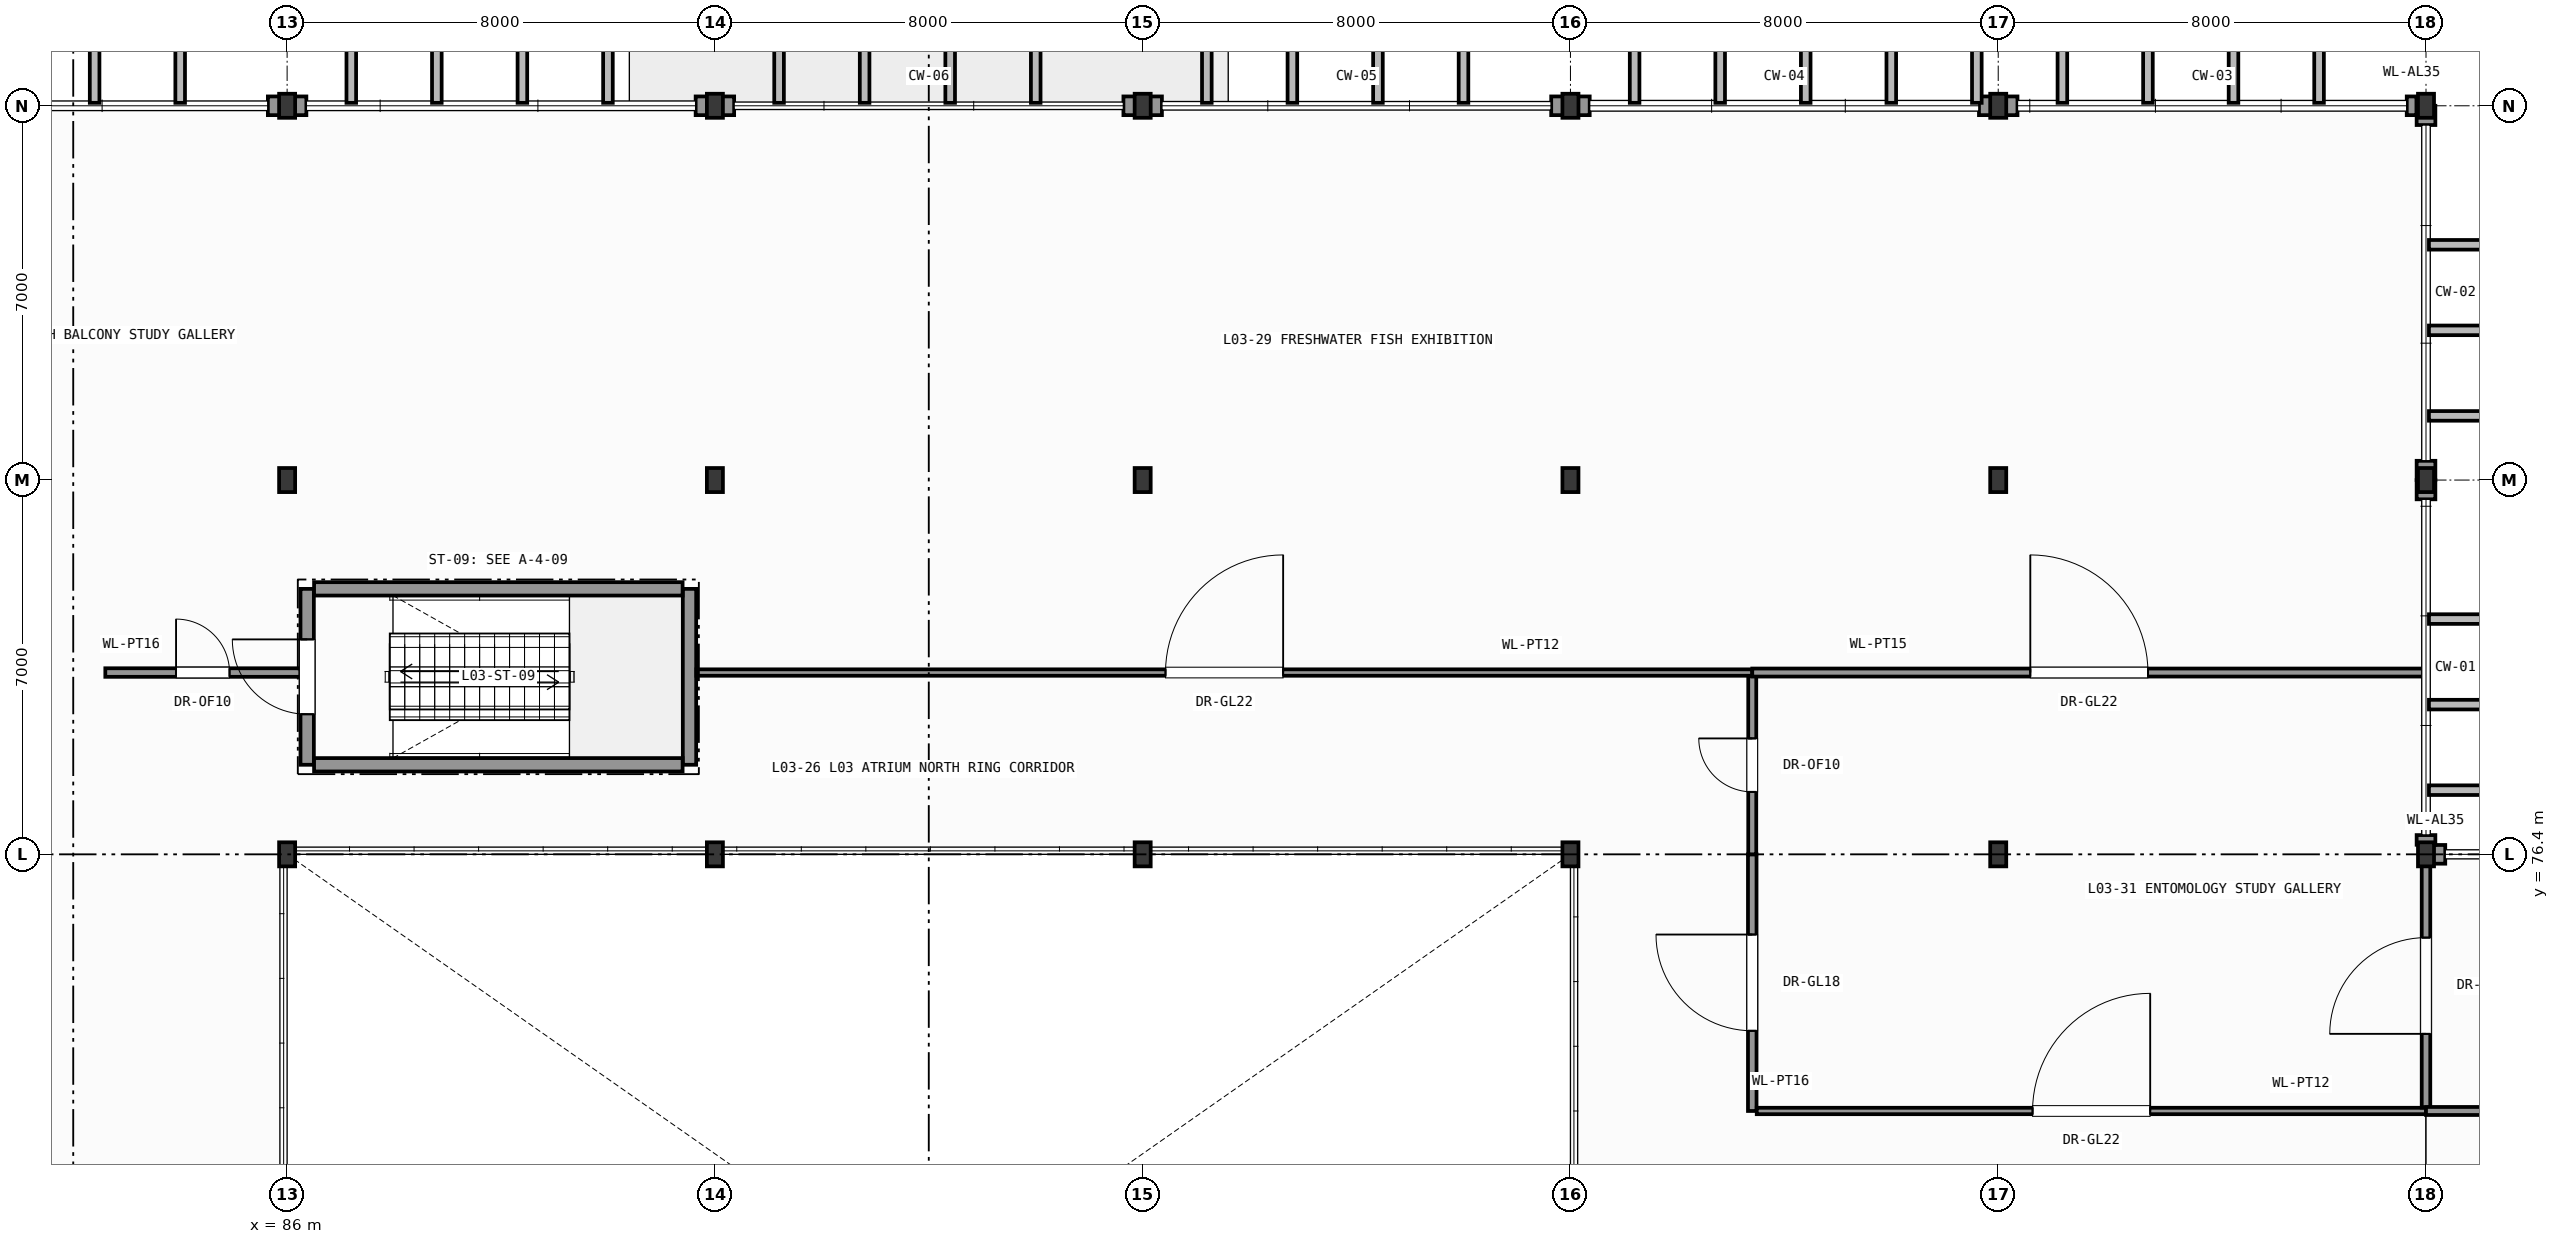
"""IFC4 building model, lengths in metres.
Left out: names, types, materials, properties, quantities, classifications, styles, units other than length and angle.
Written with IfcOpenShell. Run it as: python <this file> out.ifc"""

import sys

from ifc_helpers import new_model, si_unit, direction, frame, frame_2d, origin, origin_2d, place, context, subcontext, project, spatial, rectangle, i_section, extrude, element, fill, save


model = new_model("IFC4")
c1 = context("Model", 3, precision=1e-05, world=origin(), true_north=direction((0.0, 1.0)))
c2 = subcontext(c1, "Body", "Model", "MODEL_VIEW")
j1 = project(units=[si_unit("LENGTHUNIT", "METRE"), si_unit("PLANEANGLEUNIT", "RADIAN")], contexts=[c1])
p1 = place(None, origin())
s1 = spatial("IfcSite", under=j1, at=p1, CompositionType="ELEMENT")
p2 = place(p1, origin())
s2 = spatial("IfcBuilding", under=s1, at=p2, CompositionType="ELEMENT")
p3 = place(p2, frame((0.0, 0.0, 13.2)))
s3 = spatial("IfcBuildingStorey", under=s2, at=p3, CompositionType="ELEMENT", Elevation=13.2)
for number, where, z_axis, x_axis in (
    (1, (86.0, 76.4, 0.0), (0.0, 0.0, 1.0), (1.0, 0.0, 0.0)),
    (2, (86.0, 83.4, 0.0), (0.0, 0.0, 1.0), (1.0, 0.0, 0.0)),
    (3, (86.0, 90.4, 0.0), (0.0, 0.0, 1.0), (1.0, 0.0, 0.0)),
    (4, (94.0, 76.4, 0.0), (0.0, 0.0, 1.0), (1.0, 0.0, 0.0)),
    (5, (94.0, 83.4, 0.0), (0.0, 0.0, 1.0), (1.0, 0.0, 0.0)),
    (6, (94.0, 90.4, 0.0), (0.0, 0.0, 1.0), (1.0, 0.0, 0.0)),
    (7, (102.0, 76.4, 0.0), (0.0, 0.0, 1.0), (1.0, 0.0, 0.0)),
    (8, (102.0, 83.4, 0.0), (0.0, 0.0, 1.0), (1.0, 0.0, 0.0)),
    (9, (102.0, 90.4, 0.0), (0.0, 0.0, 1.0), (1.0, 0.0, 0.0)),
    (10, (110.0, 76.4, 0.0), (0.0, 0.0, 1.0), (1.0, 0.0, 0.0)),
    (11, (110.0, 83.4, 0.0), (0.0, 0.0, 1.0), (1.0, 0.0, 0.0)),
    (12, (110.0, 90.4, 0.0), (0.0, 0.0, 1.0), (1.0, 0.0, 0.0)),
    (13, (118.0, 76.4, 0.0), (0.0, 0.0, 1.0), (1.0, 0.0, 0.0)),
    (14, (118.0, 83.4, 0.0), (0.0, 0.0, 1.0), (1.0, 0.0, 0.0)),
    (15, (118.0, 90.4, 0.0), (0.0, 0.0, 1.0), (1.0, 0.0, 0.0)),
    (16, (126.0, 76.4, 0.0), (0.0, 0.0, 1.0), (1.0, 0.0, 0.0)),
    (17, (126.0, 83.4, 0.0), (0.0, 0.0, 1.0), (1.0, 0.0, 0.0)),
    (18, (126.0, 90.4, 0.0), (0.0, 0.0, 1.0), (1.0, 0.0, 0.0)),
):
    element("IfcColumn", number, at=place(p3, frame(where, z_axis=z_axis, x_axis=x_axis)), inside=s3, PredefinedType="COLUMN", context=c2, shape_type="SweptSolid", body=[
        extrude(i_section(OverallWidth=0.3, OverallDepth=0.45, WebThickness=0.014, FlangeThickness=0.026, FilletRadius=0.027, at=origin_2d()), origin(), (0.0, 0.0, 1.0), 4.8),
    ])
p4 = place(p3, frame((126.36, 76.4, 0.0), z_axis=(0.0, 0.0, 1.0), x_axis=(-1.0, 0.0, 0.0)))
e19 = element("IfcWall", 19, at=p4, inside=s3, PredefinedType="SOLIDWALL", context=c2, shape_type="SweptSolid", body=[
    extrude(rectangle(XDim=0.36, YDim=0.35, at=frame_2d((0.18, 0.0))), origin(), (0.0, 0.0, 1.0), 4.155),
])
p5 = place(p3, frame((126.0, 76.579, 0.0), z_axis=(0.0, 0.0, 1.0), x_axis=(0.0, 1.0, 0.0)))
e20 = element("IfcWall", 20, at=p5, inside=s3, PredefinedType="SOLIDWALL", context=c2, shape_type="SweptSolid", body=[
    extrude(rectangle(XDim=0.181, YDim=0.35, at=frame_2d((0.09, 0.0))), origin(), (0.0, 0.0, 1.0), 4.56),
])
p6 = place(p3, frame((126.0, 83.04, 0.0), z_axis=(0.0, 0.0, 1.0), x_axis=(0.0, 1.0, 0.0)))
e21 = element("IfcWall", 21, at=p6, inside=s3, PredefinedType="SOLIDWALL", context=c2, shape_type="SweptSolid", body=[
    extrude(rectangle(XDim=0.36, YDim=0.35, at=frame_2d((0.18, 0.0))), origin(), (0.0, 0.0, 1.0), 4.255),
])
p7 = place(p3, frame((126.0, 83.4, 0.0), z_axis=(0.0, 0.0, 1.0), x_axis=(0.0, 1.0, 0.0)))
e22 = element("IfcWall", 22, at=p7, inside=s3, PredefinedType="SOLIDWALL", context=c2, shape_type="SweptSolid", body=[
    extrude(rectangle(XDim=0.36, YDim=0.35, at=frame_2d((0.18, 0.0))), origin(), (0.0, 0.0, 1.0), 4.255),
])
p8 = place(p3, frame((126.0, 90.04, 0.0), z_axis=(0.0, 0.0, 1.0), x_axis=(0.0, 1.0, 0.0)))
e23 = element("IfcWall", 23, at=p8, inside=s3, PredefinedType="SOLIDWALL", context=c2, shape_type="SweptSolid", body=[
    extrude(rectangle(XDim=0.36, YDim=0.35, at=frame_2d((0.18, 0.0))), origin(), (0.0, 0.0, 1.0), 4.255),
])
p9 = place(p3, frame((125.821, 90.4, 0.0), z_axis=(0.0, 0.0, 1.0), x_axis=(-1.0, 0.0, 0.0)))
e24 = element("IfcWall", 24, at=p9, inside=s3, PredefinedType="SOLIDWALL", context=c2, shape_type="SweptSolid", body=[
    extrude(rectangle(XDim=0.181, YDim=0.35, at=frame_2d((0.091, 0.0))), origin(), (0.0, 0.0, 1.0), 4.56),
])
for number, where, z_axis, x_axis in (
    (25, (118.36, 90.4, 0.0), (0.0, 0.0, 1.0), (-1.0, 0.0, 0.0)),
    (26, (118.0, 90.4, 0.0), (0.0, 0.0, 1.0), (-1.0, 0.0, 0.0)),
    (27, (110.36, 90.4, 0.0), (0.0, 0.0, 1.0), (-1.0, 0.0, 0.0)),
    (28, (110.0, 90.4, 0.0), (0.0, 0.0, 1.0), (-1.0, 0.0, 0.0)),
    (29, (102.36, 90.4, 0.0), (0.0, 0.0, 1.0), (-1.0, 0.0, 0.0)),
    (30, (102.0, 90.4, 0.0), (0.0, 0.0, 1.0), (-1.0, 0.0, 0.0)),
    (31, (94.36, 90.4, 0.0), (0.0, 0.0, 1.0), (-1.0, 0.0, 0.0)),
    (32, (94.0, 90.4, 0.0), (0.0, 0.0, 1.0), (-1.0, 0.0, 0.0)),
    (33, (86.36, 90.4, 0.0), (0.0, 0.0, 1.0), (-1.0, 0.0, 0.0)),
    (34, (86.0, 90.4, 0.0), (0.0, 0.0, 1.0), (-1.0, 0.0, 0.0)),
):
    element("IfcWall", number, at=place(p3, frame(where, z_axis=z_axis, x_axis=x_axis)), inside=s3, PredefinedType="SOLIDWALL", context=c2, shape_type="SweptSolid", body=[
        extrude(rectangle(XDim=0.36, YDim=0.35, at=frame_2d((0.18, 0.0))), origin(), (0.0, 0.0, 1.0), 4.155),
    ])
p10 = place(p3, frame((86.375, 78.075, 0.0), z_axis=(0.0, 0.0, 1.0), x_axis=(0.0, 1.0, 0.0)))
e35 = element("IfcWall", 35, at=p10, inside=s3, PredefinedType="SHEAR", context=c2, shape_type="SweptSolid", body=[
    extrude(rectangle(XDim=3.29, YDim=0.25, at=frame_2d((1.645, 0.0))), origin(), (0.0, 0.0, 1.0), 4.56),
])
p11 = place(p10, frame((0.945, 0.0, 0.0)))
e36 = element("IfcOpeningElement", 36, at=p11, cuts=e35, PredefinedType="OPENING", context=c2, shape_type="SweptSolid", body=[
    extrude(rectangle(XDim=1.4, YDim=2.2, at=frame_2d((0.7, 1.1))), frame((0.0, 0.135, 0.0), z_axis=(0.0, -1.0, 0.0), x_axis=(1.0, 0.0, 0.0)), (0.0, 0.0, 1.0), 0.27),
])
p12 = place(p3, frame((93.525, 78.075, 0.0), z_axis=(0.0, 0.0, 1.0), x_axis=(0.0, 1.0, 0.0)))
e37 = element("IfcWall", 37, at=p12, inside=s3, PredefinedType="SHEAR", context=c2, shape_type="SweptSolid", body=[
    extrude(rectangle(XDim=3.29, YDim=0.25, at=frame_2d((1.645, 0.0))), origin(), (0.0, 0.0, 1.0), 4.56),
])
for number, where, z_axis, x_axis in (
    (38, (86.504, 78.075, 0.0), (0.0, 0.0, 1.0), (1.0, 0.0, 0.0)),
    (39, (86.504, 81.365, 0.0), (0.0, 0.0, 1.0), (1.0, 0.0, 0.0)),
):
    element("IfcWall", number, at=place(p3, frame(where, z_axis=z_axis, x_axis=x_axis)), inside=s3, PredefinedType="SHEAR", context=c2, shape_type="SweptSolid", body=[
        extrude(rectangle(XDim=6.892, YDim=0.25, at=frame_2d((3.446, 0.0))), origin(), (0.0, 0.0, 1.0), 4.56),
    ])
p13 = place(p3, frame((113.4, 71.6, 0.0), z_axis=(0.0, 0.0, 1.0), x_axis=(0.0, 1.0, 0.0)))
e40 = element("IfcWall", 40, at=p13, inside=s3, PredefinedType="PARTITIONING", context=c2, shape_type="SweptSolid", body=[
    extrude(rectangle(XDim=4.8, YDim=0.16, at=frame_2d((2.4, 0.0))), origin(), (0.0, 0.0, 1.0), 4.56),
])
p14 = place(p13, frame((1.5, 0.0, 0.0)))
e41 = element("IfcOpeningElement", 41, at=p14, cuts=e40, PredefinedType="OPENING", context=c2, shape_type="SweptSolid", body=[
    extrude(rectangle(XDim=1.8, YDim=2.4, at=frame_2d((0.9, 1.2))), frame((0.0, 0.09, 0.0), z_axis=(0.0, -1.0, 0.0), x_axis=(1.0, 0.0, 0.0)), (0.0, 0.0, 1.0), 0.18),
])
p15 = place(p3, frame((93.654, 79.8, 0.0), z_axis=(0.0, 0.0, 1.0), x_axis=(1.0, 0.0, 0.0)))
e42 = element("IfcWall", 42, at=p15, inside=s3, PredefinedType="PARTITIONING", context=c2, shape_type="SweptSolid", body=[
    extrude(rectangle(XDim=19.746, YDim=0.12, at=frame_2d((9.873, 0.0))), origin(), (0.0, 0.0, 1.0), 4.185),
])
p16 = place(p15, frame((8.773, 0.0, 0.0)))
e43 = element("IfcOpeningElement", 43, at=p16, cuts=e42, PredefinedType="OPENING", context=c2, shape_type="SweptSolid", body=[
    extrude(rectangle(XDim=2.2, YDim=2.6, at=frame_2d((1.1, 1.3))), frame((0.0, 0.07, 0.0), z_axis=(0.0, -1.0, 0.0), x_axis=(1.0, 0.0, 0.0)), (0.0, 0.0, 1.0), 0.14),
])
p17 = place(p3, frame((82.6, 79.8, 0.0), z_axis=(0.0, 0.0, 1.0), x_axis=(1.0, 0.0, 0.0)))
e44 = element("IfcWall", 44, at=p17, inside=s3, PredefinedType="PARTITIONING", context=c2, shape_type="SweptSolid", body=[
    extrude(rectangle(XDim=3.646, YDim=0.16, at=frame_2d((1.823, 0.0))), origin(), (0.0, 0.0, 1.0), 4.215),
])
p18 = place(p17, frame((1.323, 0.0, 0.0)))
e45 = element("IfcOpeningElement", 45, at=p18, cuts=e44, PredefinedType="OPENING", context=c2, shape_type="SweptSolid", body=[
    extrude(rectangle(XDim=1.0, YDim=2.15, at=frame_2d((0.5, 1.075))), frame((0.0, 0.09, 0.0), z_axis=(0.0, -1.0, 0.0), x_axis=(1.0, 0.0, 0.0)), (0.0, 0.0, 1.0), 0.18),
])
p19 = place(p3, frame((113.4, 76.4, 0.0), z_axis=(0.0, 0.0, 1.0), x_axis=(0.0, 1.0, 0.0)))
e46 = element("IfcWall", 46, at=p19, inside=s3, PredefinedType="PARTITIONING", context=c2, shape_type="SweptSolid", body=[
    extrude(rectangle(XDim=3.336, YDim=0.15, at=frame_2d((1.668, 0.0))), origin(), (0.0, 0.0, 1.0), 4.56),
])
p20 = place(p19, frame((1.168, 0.0, 0.0)))
e47 = element("IfcOpeningElement", 47, at=p20, cuts=e46, PredefinedType="OPENING", context=c2, shape_type="SweptSolid", body=[
    extrude(rectangle(XDim=1.0, YDim=2.15, at=frame_2d((0.5, 1.075))), frame((0.0, 0.085, 0.0), z_axis=(0.0, -1.0, 0.0), x_axis=(1.0, 0.0, 0.0)), (0.0, 0.0, 1.0), 0.17),
])
p21 = place(p3, frame((113.4, 79.8, 0.0), z_axis=(0.0, 0.0, 1.0), x_axis=(1.0, 0.0, 0.0)))
e48 = element("IfcWall", 48, at=p21, inside=s3, PredefinedType="PARTITIONING", context=c2, shape_type="SweptSolid", body=[
    extrude(rectangle(XDim=12.6, YDim=0.15, at=frame_2d((6.3, 0.0))), origin(), (0.0, 0.0, 1.0), 4.185),
])
p22 = place(p21, frame((5.2, 0.0, 0.0)))
e49 = element("IfcOpeningElement", 49, at=p22, cuts=e48, PredefinedType="OPENING", context=c2, shape_type="SweptSolid", body=[
    extrude(rectangle(XDim=2.2, YDim=2.6, at=frame_2d((1.1, 1.3))), frame((0.0, 0.085, 0.0), z_axis=(0.0, -1.0, 0.0), x_axis=(1.0, 0.0, 0.0)), (0.0, 0.0, 1.0), 0.17),
])
p23 = place(p3, frame((113.484, 71.6, 0.0), z_axis=(0.0, 0.0, 1.0), x_axis=(1.0, 0.0, 0.0)))
e50 = element("IfcWall", 50, at=p23, inside=s3, PredefinedType="PARTITIONING", context=c2, shape_type="SweptSolid", body=[
    extrude(rectangle(XDim=12.516, YDim=0.12, at=frame_2d((6.258, 0.0))), origin(), (0.0, 0.0, 1.0), 4.56),
])
p24 = place(p23, frame((5.158, 0.0, 0.0)))
e51 = element("IfcOpeningElement", 51, at=p24, cuts=e50, PredefinedType="OPENING", context=c2, shape_type="SweptSolid", body=[
    extrude(rectangle(XDim=2.2, YDim=2.6, at=frame_2d((1.1, 1.3))), frame((0.0, 0.07, 0.0), z_axis=(0.0, -1.0, 0.0), x_axis=(1.0, 0.0, 0.0)), (0.0, 0.0, 1.0), 0.14),
])
p25 = place(p3, frame((126.0, 71.664, 0.0), z_axis=(0.0, 0.0, 1.0), x_axis=(0.0, 1.0, 0.0)))
e52 = element("IfcWall", 52, at=p25, inside=s3, PredefinedType="PARTITIONING", context=c2, shape_type="SweptSolid", body=[
    extrude(rectangle(XDim=4.557, YDim=0.16, at=frame_2d((2.278, 0.0))), origin(), (0.0, 0.0, 1.0), 4.105),
])
p26 = place(p25, frame((1.378, 0.0, 0.0)))
e53 = element("IfcOpeningElement", 53, at=p26, cuts=e52, PredefinedType="OPENING", context=c2, shape_type="SweptSolid", body=[
    extrude(rectangle(XDim=1.8, YDim=2.4, at=frame_2d((0.9, 1.2))), frame((0.0, 0.09, 0.0), z_axis=(0.0, -1.0, 0.0), x_axis=(1.0, 0.0, 0.0)), (0.0, 0.0, 1.0), 0.18),
])
p27 = place(p3, frame((126.0, 71.6, 0.0), z_axis=(0.0, 0.0, 1.0), x_axis=(1.0, 0.0, 0.0)))
e54 = element("IfcWall", 54, at=p27, inside=s3, PredefinedType="PARTITIONING", context=c2, shape_type="SweptSolid", body=[
    extrude(rectangle(XDim=41.0, YDim=0.15, at=frame_2d((20.5, 0.0))), origin(), (0.0, 0.0, 1.0), 4.56),
])
p28 = place(p27, frame((19.4, 0.0, 0.0)))
e55 = element("IfcOpeningElement", 55, at=p28, cuts=e54, PredefinedType="OPENING", context=c2, shape_type="SweptSolid", body=[
    extrude(rectangle(XDim=2.2, YDim=2.6, at=frame_2d((1.1, 1.3))), frame((0.0, 0.085, 0.0), z_axis=(0.0, -1.0, 0.0), x_axis=(1.0, 0.0, 0.0)), (0.0, 0.0, 1.0), 0.17),
])
p29 = place(p11, origin())
e56 = element("IfcDoor", 56, at=p29, inside=s3, OperationType="SINGLE_SWING_RIGHT", PredefinedType="DOOR", context=c2, shape_type="SweptSolid", body=[
    extrude(rectangle(XDim=1.4, YDim=2.2, at=frame_2d((0.7, 1.1))), frame((0.0, 0.025, 0.0), z_axis=(0.0, -1.0, 0.0), x_axis=(1.0, 0.0, 0.0)), (0.0, 0.0, 1.0), 0.05),
])
fill(e36, e56)
p30 = place(p14, origin())
e57 = element("IfcDoor", 57, at=p30, inside=s3, OperationType="SINGLE_SWING_RIGHT", PredefinedType="DOOR", context=c2, shape_type="SweptSolid", body=[
    extrude(rectangle(XDim=1.8, YDim=2.4, at=frame_2d((0.9, 1.2))), frame((0.0, 0.025, 0.0), z_axis=(0.0, -1.0, 0.0), x_axis=(1.0, 0.0, 0.0)), (0.0, 0.0, 1.0), 0.05),
])
fill(e41, e57)
p31 = place(p16, origin())
e58 = element("IfcDoor", 58, at=p31, inside=s3, OperationType="SINGLE_SWING_RIGHT", PredefinedType="DOOR", context=c2, shape_type="SweptSolid", body=[
    extrude(rectangle(XDim=2.2, YDim=2.6, at=frame_2d((1.1, 1.3))), frame((0.0, 0.025, 0.0), z_axis=(0.0, -1.0, 0.0), x_axis=(1.0, 0.0, 0.0)), (0.0, 0.0, 1.0), 0.05),
])
fill(e43, e58)
p32 = place(p18, origin())
e59 = element("IfcDoor", 59, at=p32, inside=s3, OperationType="SINGLE_SWING_LEFT", PredefinedType="DOOR", context=c2, shape_type="SweptSolid", body=[
    extrude(rectangle(XDim=1.0, YDim=2.15, at=frame_2d((0.5, 1.075))), frame((0.0, 0.025, 0.0), z_axis=(0.0, -1.0, 0.0), x_axis=(1.0, 0.0, 0.0)), (0.0, 0.0, 1.0), 0.05),
])
fill(e45, e59)
p33 = place(p20, origin())
e60 = element("IfcDoor", 60, at=p33, inside=s3, OperationType="SINGLE_SWING_RIGHT", PredefinedType="DOOR", context=c2, shape_type="SweptSolid", body=[
    extrude(rectangle(XDim=1.0, YDim=2.15, at=frame_2d((0.5, 1.075))), frame((0.0, 0.025, 0.0), z_axis=(0.0, -1.0, 0.0), x_axis=(1.0, 0.0, 0.0)), (0.0, 0.0, 1.0), 0.05),
])
fill(e47, e60)
p34 = place(p22, origin())
e61 = element("IfcDoor", 61, at=p34, inside=s3, OperationType="SINGLE_SWING_LEFT", PredefinedType="DOOR", context=c2, shape_type="SweptSolid", body=[
    extrude(rectangle(XDim=2.2, YDim=2.6, at=frame_2d((1.1, 1.3))), frame((0.0, 0.025, 0.0), z_axis=(0.0, -1.0, 0.0), x_axis=(1.0, 0.0, 0.0)), (0.0, 0.0, 1.0), 0.05),
])
fill(e49, e61)
p35 = place(p24, origin())
e62 = element("IfcDoor", 62, at=p35, inside=s3, OperationType="SINGLE_SWING_RIGHT", PredefinedType="DOOR", context=c2, shape_type="SweptSolid", body=[
    extrude(rectangle(XDim=2.2, YDim=2.6, at=frame_2d((1.1, 1.3))), frame((0.0, 0.025, 0.0), z_axis=(0.0, -1.0, 0.0), x_axis=(1.0, 0.0, 0.0)), (0.0, 0.0, 1.0), 0.05),
])
fill(e51, e62)
p36 = place(p26, origin())
e63 = element("IfcDoor", 63, at=p36, inside=s3, OperationType="SINGLE_SWING_LEFT", PredefinedType="DOOR", context=c2, shape_type="SweptSolid", body=[
    extrude(rectangle(XDim=1.8, YDim=2.4, at=frame_2d((0.9, 1.2))), frame((0.0, 0.025, 0.0), z_axis=(0.0, -1.0, 0.0), x_axis=(1.0, 0.0, 0.0)), (0.0, 0.0, 1.0), 0.05),
])
fill(e53, e63)
save(model, sys.argv[1])
